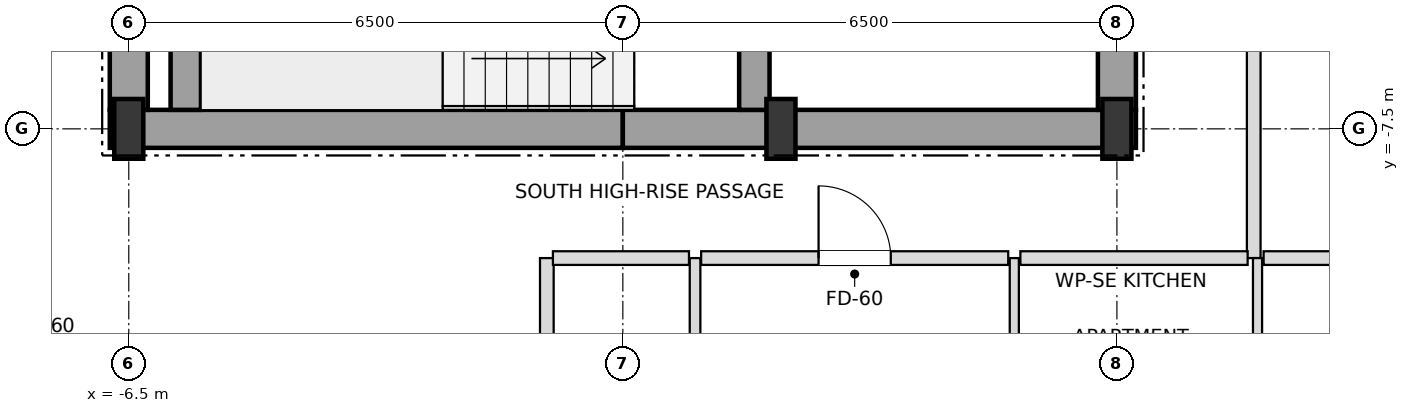
"""IFC4 building model, lengths in metres.
Left out: names, types, materials, properties, quantities, classifications, styles, units other than length and angle.
Written with IfcOpenShell. Run it as: python <this file> out.ifc"""

import sys

from ifc_helpers import new_model, si_unit, direction, frame, frame_2d, origin, origin_2d, place, context, subcontext, project, spatial, rectangle, i_section, extrude, element, fill, save


model = new_model("IFC4")
c1 = context("Model", 3, precision=1e-05, world=origin(), true_north=direction((0.0, 1.0)))
c2 = subcontext(c1, "Body", "Model", "MODEL_VIEW")
j1 = project(units=[si_unit("LENGTHUNIT", "METRE"), si_unit("PLANEANGLEUNIT", "RADIAN")], contexts=[c1])
p1 = place(None, origin())
s1 = spatial("IfcSite", under=j1, at=p1, CompositionType="ELEMENT")
p2 = place(p1, origin())
s2 = spatial("IfcBuilding", under=s1, at=p2, CompositionType="ELEMENT")
p3 = place(p2, frame((0.0, 0.0, 265.5)))
s3 = spatial("IfcBuildingStorey", under=s2, at=p3, CompositionType="ELEMENT", Elevation=265.5)
for number, where, z_axis, x_axis in (
    (1, (-6.5, -7.5, 0.0), (0.0, 0.0, 1.0), (1.0, 0.0, 0.0)),
    (2, (2.08, -7.5, 0.0), (0.0, 0.0, 1.0), (1.0, 0.0, 0.0)),
    (3, (6.5, -7.5, 0.0), (0.0, 0.0, 1.0), (1.0, 0.0, 0.0)),
):
    element("IfcColumn", number, at=place(p3, frame(where, z_axis=z_axis, x_axis=x_axis)), inside=s3, PredefinedType="COLUMN", context=c2, shape_type="SweptSolid", body=[
        extrude(i_section(OverallWidth=0.382, OverallDepth=0.786, WebThickness=0.02, FlangeThickness=0.033, at=origin_2d()), origin(), (0.0, 0.0, 1.0), 3.6),
    ])
for number, where, z_axis, x_axis in (
    (4, (-6.75, -7.5, 0.0), (0.0, 0.0, 1.0), (1.0, 0.0, 0.0)),
    (5, (0.0, -7.5, 0.0), (0.0, 0.0, 1.0), (1.0, 0.0, 0.0)),
):
    element("IfcWall", number, at=place(p3, frame(where, z_axis=z_axis, x_axis=x_axis)), inside=s3, PredefinedType="SHEAR", context=c2, shape_type="SweptSolid", body=[
        extrude(rectangle(XDim=6.75, YDim=0.5, at=frame_2d((3.375, 0.0))), origin(), (0.0, 0.0, 1.0), 3.38),
    ])
p4 = place(p3, frame((-6.5, -7.25, 0.0), z_axis=(0.0, 0.0, 1.0), x_axis=(0.0, 1.0, 0.0)))
e6 = element("IfcWall", 6, at=p4, inside=s3, PredefinedType="SHEAR", context=c2, shape_type="SweptSolid", body=[
    extrude(rectangle(XDim=3.55, YDim=0.5, at=frame_2d((1.775, 0.0))), origin(), (0.0, 0.0, 1.0), 3.38),
])
p5 = place(p3, frame((6.5, -7.25, 0.0), z_axis=(0.0, 0.0, 1.0), x_axis=(0.0, 1.0, 0.0)))
e7 = element("IfcWall", 7, at=p5, inside=s3, PredefinedType="SHEAR", context=c2, shape_type="SweptSolid", body=[
    extrude(rectangle(XDim=5.75, YDim=0.5, at=frame_2d((2.875, 0.0))), origin(), (0.0, 0.0, 1.0), 3.38),
])
p6 = place(p5, frame((0.85, 0.0, 0.0)))
e8 = element("IfcOpeningElement", 8, at=p6, cuts=e7, PredefinedType="OPENING", context=c2, shape_type="SweptSolid", body=[
    extrude(rectangle(XDim=1.05, YDim=2.15, at=frame_2d((0.525, 1.075))), frame((0.0, 0.26, 0.0), z_axis=(0.0, -1.0, 0.0), x_axis=(1.0, 0.0, 0.0)), (0.0, 0.0, 1.0), 0.52),
])
p7 = place(p3, frame((-5.75, -7.25, 0.0), z_axis=(0.0, 0.0, 1.0), x_axis=(0.0, 1.0, 0.0)))
e9 = element("IfcWall", 9, at=p7, inside=s3, PredefinedType="SHEAR", context=c2, shape_type="SweptSolid", body=[
    extrude(rectangle(XDim=2.9, YDim=0.4, at=frame_2d((1.45, 0.0))), origin(), (0.0, 0.0, 1.0), 3.38),
])
p8 = place(p3, frame((1.73, -7.25, 0.0), z_axis=(0.0, 0.0, 1.0), x_axis=(0.0, 1.0, 0.0)))
e10 = element("IfcWall", 10, at=p8, inside=s3, PredefinedType="SHEAR", context=c2, shape_type="SweptSolid", body=[
    extrude(rectangle(XDim=3.3, YDim=0.4, at=frame_2d((1.65, 0.0))), origin(), (0.0, 0.0, 1.0), 3.38),
])
p9 = place(p8, frame((0.9, 0.0, 0.0)))
e11 = element("IfcOpeningElement", 11, at=p9, cuts=e10, PredefinedType="OPENING", context=c2, shape_type="SweptSolid", body=[
    extrude(rectangle(XDim=1.05, YDim=2.15, at=frame_2d((0.525, 1.075))), frame((0.0, 0.21, 0.0), z_axis=(0.0, -1.0, 0.0), x_axis=(1.0, 0.0, 0.0)), (0.0, 0.0, 1.0), 0.42),
])
p10 = place(p3, frame((-1.0, -19.9, 0.0), z_axis=(0.0, 0.0, 1.0), x_axis=(0.0, 1.0, 0.0)))
e12 = element("IfcWall", 12, at=p10, inside=s3, PredefinedType="PARTITIONING", context=c2, shape_type="SweptSolid", body=[
    extrude(rectangle(XDim=10.7, YDim=0.18, at=frame_2d((5.35, 0.0))), origin(), (0.0, 0.0, 1.0), 3.018),
])
p11 = place(p3, frame((0.95, -13.9, 0.0), z_axis=(0.0, 0.0, 1.0), x_axis=(0.0, 1.0, 0.0)))
e13 = element("IfcWall", 13, at=p11, inside=s3, PredefinedType="PARTITIONING", context=c2, shape_type="SweptSolid", body=[
    extrude(rectangle(XDim=4.7, YDim=0.14, at=frame_2d((2.35, 0.0))), origin(), (0.0, 0.0, 1.0), 3.38),
])
p12 = place(p11, frame((1.9, 0.0, 0.0)))
e14 = element("IfcOpeningElement", 14, at=p12, cuts=e13, PredefinedType="OPENING", context=c2, shape_type="SweptSolid", body=[
    extrude(rectangle(XDim=0.9, YDim=2.1, at=frame_2d((0.45, 1.05))), frame((0.0, 0.08, 0.0), z_axis=(0.0, -1.0, 0.0), x_axis=(1.0, 0.0, 0.0)), (0.0, 0.0, 1.0), 0.16),
])
p13 = place(p3, frame((5.15, -13.9, 0.0), z_axis=(0.0, 0.0, 1.0), x_axis=(0.0, 1.0, 0.0)))
e15 = element("IfcWall", 15, at=p13, inside=s3, PredefinedType="PARTITIONING", context=c2, shape_type="SweptSolid", body=[
    extrude(rectangle(XDim=4.7, YDim=0.12, at=frame_2d((2.35, 0.0))), origin(), (0.0, 0.0, 1.0), 3.38),
])
p14 = place(p13, frame((1.875, 0.0, 0.0)))
e16 = element("IfcOpeningElement", 16, at=p14, cuts=e15, PredefinedType="OPENING", context=c2, shape_type="SweptSolid", body=[
    extrude(rectangle(XDim=0.95, YDim=2.1, at=frame_2d((0.475, 1.05))), frame((0.0, 0.07, 0.0), z_axis=(0.0, -1.0, 0.0), x_axis=(1.0, 0.0, 0.0)), (0.0, 0.0, 1.0), 0.14),
])
p15 = place(p3, frame((8.3, -9.2, 0.0), z_axis=(0.0, 0.0, 1.0), x_axis=(0.0, 1.0, 0.0)))
e17 = element("IfcWall", 17, at=p15, inside=s3, PredefinedType="PARTITIONING", context=c2, shape_type="SweptSolid", body=[
    extrude(rectangle(XDim=5.4, YDim=0.18, at=frame_2d((2.7, 0.0))), origin(), (0.0, 0.0, 1.0), 2.826),
])
p16 = place(p15, frame((3.125, 0.0, 0.0)))
e18 = element("IfcOpeningElement", 18, at=p16, cuts=e17, PredefinedType="OPENING", context=c2, shape_type="SweptSolid", body=[
    extrude(rectangle(XDim=0.95, YDim=2.15, at=frame_2d((0.475, 1.075))), frame((0.0, 0.1, 0.0), z_axis=(0.0, -1.0, 0.0), x_axis=(1.0, 0.0, 0.0)), (0.0, 0.0, 1.0), 0.2),
])
p17 = place(p3, frame((8.35, -19.9, 0.0), z_axis=(0.0, 0.0, 1.0), x_axis=(0.0, 1.0, 0.0)))
e19 = element("IfcWall", 19, at=p17, inside=s3, PredefinedType="PARTITIONING", context=c2, shape_type="SweptSolid", body=[
    extrude(rectangle(XDim=10.7, YDim=0.12, at=frame_2d((5.35, 0.0))), origin(), (0.0, 0.0, 1.0), 2.826),
])
p18 = place(p17, frame((7.875, 0.0, 0.0)))
e20 = element("IfcOpeningElement", 20, at=p18, cuts=e19, PredefinedType="OPENING", context=c2, shape_type="SweptSolid", body=[
    extrude(rectangle(XDim=0.95, YDim=2.1, at=frame_2d((0.475, 1.05))), frame((0.0, 0.07, 0.0), z_axis=(0.0, -1.0, 0.0), x_axis=(1.0, 0.0, 0.0)), (0.0, 0.0, 1.0), 0.14),
])
p19 = place(p17, frame((2.55, 0.0, 0.0)))
e21 = element("IfcOpeningElement", 21, at=p19, cuts=e19, PredefinedType="OPENING", context=c2, shape_type="SweptSolid", body=[
    extrude(rectangle(XDim=0.9, YDim=2.1, at=frame_2d((0.45, 1.05))), frame((0.0, 0.07, 0.0), z_axis=(0.0, -1.0, 0.0), x_axis=(1.0, 0.0, 0.0)), (0.0, 0.0, 1.0), 0.14),
])
p20 = place(p3, frame((-0.92, -9.2, 0.0), z_axis=(0.0, 0.0, 1.0), x_axis=(1.0, 0.0, 0.0)))
e22 = element("IfcWall", 22, at=p20, inside=s3, PredefinedType="PARTITIONING", context=c2, shape_type="SweptSolid", body=[
    extrude(rectangle(XDim=1.79, YDim=0.18, at=frame_2d((0.895, 0.0))), origin(), (0.0, 0.0, 1.0), 3.38),
])
p21 = place(p3, frame((1.03, -9.2, 0.0), z_axis=(0.0, 0.0, 1.0), x_axis=(1.0, 0.0, 0.0)))
e23 = element("IfcWall", 23, at=p21, inside=s3, PredefinedType="PARTITIONING", context=c2, shape_type="SweptSolid", body=[
    extrude(rectangle(XDim=4.04, YDim=0.18, at=frame_2d((2.02, 0.0))), origin(), (0.0, 0.0, 1.0), 3.38),
])
p22 = place(p21, frame((1.545, 0.0, 0.0)))
e24 = element("IfcOpeningElement", 24, at=p22, cuts=e23, PredefinedType="OPENING", context=c2, shape_type="SweptSolid", body=[
    extrude(rectangle(XDim=0.95, YDim=2.15, at=frame_2d((0.475, 1.075))), frame((0.0, 0.1, 0.0), z_axis=(0.0, -1.0, 0.0), x_axis=(1.0, 0.0, 0.0)), (0.0, 0.0, 1.0), 0.2),
])
p23 = place(p3, frame((5.23, -9.2, 0.0), z_axis=(0.0, 0.0, 1.0), x_axis=(1.0, 0.0, 0.0)))
e25 = element("IfcWall", 25, at=p23, inside=s3, PredefinedType="PARTITIONING", context=c2, shape_type="SweptSolid", body=[
    extrude(rectangle(XDim=2.99, YDim=0.18, at=frame_2d((1.495, 0.0))), origin(), (0.0, 0.0, 1.0), 2.826),
])
p24 = place(p3, frame((8.43, -9.2, 0.0), z_axis=(0.0, 0.0, 1.0), x_axis=(1.0, 0.0, 0.0)))
e26 = element("IfcWall", 26, at=p24, inside=s3, PredefinedType="PARTITIONING", context=c2, shape_type="SweptSolid", body=[
    extrude(rectangle(XDim=2.89, YDim=0.18, at=frame_2d((1.445, 0.0))), origin(), (0.0, 0.0, 1.0), 3.38),
])
p25 = place(p22, origin())
e27 = element("IfcDoor", 27, at=p25, inside=s3, OperationType="SINGLE_SWING_LEFT", PredefinedType="DOOR", context=c2, shape_type="SweptSolid", body=[
    extrude(rectangle(XDim=0.95, YDim=2.15, at=frame_2d((0.475, 1.075))), frame((0.0, 0.025, 0.0), z_axis=(0.0, -1.0, 0.0), x_axis=(1.0, 0.0, 0.0)), (0.0, 0.0, 1.0), 0.05),
])
fill(e24, e27)
save(model, sys.argv[1])
